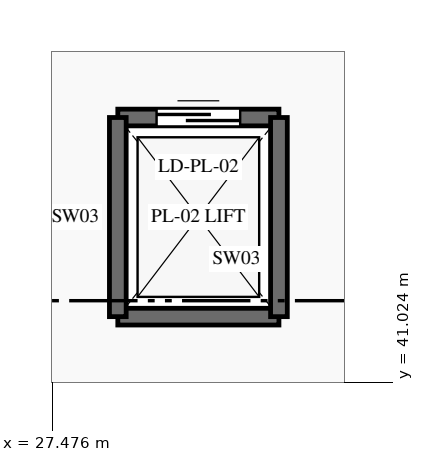
"""IFC4 building model, lengths in metres.
Left out: names, types, materials, properties, quantities, classifications, styles, units other than length and angle.
Written with IfcOpenShell. Run it as: python <this file> out.ifc"""

import sys

from ifc_helpers import new_model, si_unit, direction, frame, frame_2d, origin, place, context, subcontext, project, spatial, rectangle, extrude, element, fill, save


model = new_model("IFC4")
c1 = context("Model", 3, precision=1e-05, world=origin(), true_north=direction((0.0, 1.0)))
c2 = subcontext(c1, "Body", "Model", "MODEL_VIEW")
j1 = project(units=[si_unit("LENGTHUNIT", "METRE"), si_unit("PLANEANGLEUNIT", "RADIAN")], contexts=[c1])
p1 = place(None, origin())
s1 = spatial("IfcSite", under=j1, at=p1, CompositionType="ELEMENT")
p2 = place(p1, origin())
s2 = spatial("IfcBuilding", under=s1, at=p2, CompositionType="ELEMENT")
p3 = place(p2, frame((0.0, 0.0, 6.0)))
s3 = spatial("IfcBuildingStorey", under=s2, at=p3, CompositionType="ELEMENT", Elevation=6.0)
p4 = place(p3, frame((28.34, 41.89, 0.0), z_axis=(0.0, 0.0, 1.0), x_axis=(1.0, 0.0, 0.0)))
e1 = element("IfcWall", 1, at=p4, inside=s3, PredefinedType="SHEAR", context=c2, shape_type="SweptSolid", body=[
    extrude(rectangle(XDim=2.12, YDim=0.22, at=frame_2d((1.06, 0.0))), origin(), (0.0, 0.0, 1.0), 4.8),
])
p5 = place(p3, frame((28.34, 44.51, 0.0), z_axis=(0.0, 0.0, 1.0), x_axis=(1.0, 0.0, 0.0)))
e2 = element("IfcWall", 2, at=p5, inside=s3, PredefinedType="SHEAR", context=c2, shape_type="SweptSolid", body=[
    extrude(rectangle(XDim=2.12, YDim=0.22, at=frame_2d((1.06, 0.0))), origin(), (0.0, 0.0, 1.0), 4.8),
])
p6 = place(p5, frame((0.51, 0.0, 0.0)))
e3 = element("IfcOpeningElement", 3, at=p6, cuts=e2, PredefinedType="OPENING", context=c2, shape_type="SweptSolid", body=[
    extrude(rectangle(XDim=1.1, YDim=2.15, at=frame_2d((0.55, 1.075))), frame((0.0, 0.125, 0.0), z_axis=(0.0, -1.0, 0.0), x_axis=(1.0, 0.0, 0.0)), (0.0, 0.0, 1.0), 0.25),
])
for number, where, z_axis, x_axis in (
    (4, (28.34, 41.89, 0.0), (0.0, 0.0, 1.0), (0.0, 1.0, 0.0)),
    (5, (30.46, 41.89, 0.0), (0.0, 0.0, 1.0), (0.0, 1.0, 0.0)),
):
    element("IfcWall", number, at=place(p3, frame(where, z_axis=z_axis, x_axis=x_axis)), inside=s3, PredefinedType="SHEAR", context=c2, shape_type="SweptSolid", body=[
        extrude(rectangle(XDim=2.62, YDim=0.22, at=frame_2d((1.31, 0.0))), origin(), (0.0, 0.0, 1.0), 4.8),
    ])
p7 = place(p6, origin())
e6 = element("IfcDoor", 6, at=p7, inside=s3, OperationType="SLIDING_TO_RIGHT", PredefinedType="DOOR", context=c2, shape_type="SweptSolid", body=[
    extrude(rectangle(XDim=1.1, YDim=2.15, at=frame_2d((0.55, 1.075))), frame((0.0, 0.025, 0.0), z_axis=(0.0, -1.0, 0.0), x_axis=(1.0, 0.0, 0.0)), (0.0, 0.0, 1.0), 0.05),
])
fill(e3, e6)
save(model, sys.argv[1])
